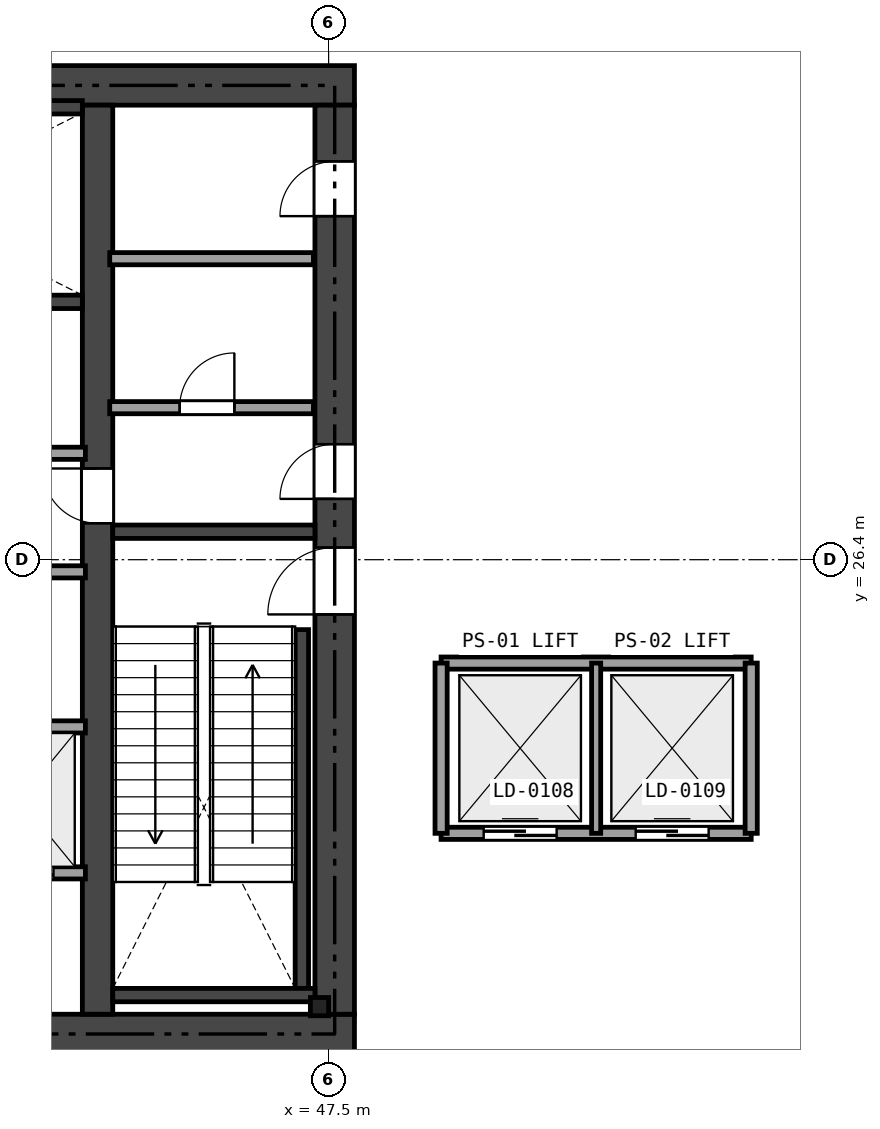
"""IFC4 building model, lengths in metres.
Left out: names, types, materials, properties, quantities, classifications, styles, units other than length and angle.
Written with IfcOpenShell. Run it as: python <this file> out.ifc"""

import sys

from ifc_helpers import new_model, si_unit, direction, frame, frame_2d, origin, origin_2d, place, context, subcontext, project, spatial, rectangle, i_section, extrude, element, fill, save


model = new_model("IFC4")
c1 = context("Model", 3, precision=1e-05, world=origin(), true_north=direction((0.0, 1.0)))
c2 = subcontext(c1, "Body", "Model", "MODEL_VIEW")
j1 = project(units=[si_unit("LENGTHUNIT", "METRE"), si_unit("PLANEANGLEUNIT", "RADIAN")], contexts=[c1])
p1 = place(None, origin())
s1 = spatial("IfcSite", under=j1, at=p1, CompositionType="ELEMENT")
p2 = place(p1, origin())
s2 = spatial("IfcBuilding", under=s1, at=p2, CompositionType="ELEMENT")
p3 = place(p2, frame((0.0, 0.0, 5.4)))
s3 = spatial("IfcBuildingStorey", under=s2, at=p3, CompositionType="ELEMENT", Elevation=5.4)
p4 = place(p3, frame((26.475, 18.6, 0.0), z_axis=(0.0, 0.0, 1.0), x_axis=(1.0, 0.0, 0.0)))
e1 = element("IfcWall", 1, at=p4, inside=s3, PredefinedType="SHEAR", context=c2, shape_type="SweptSolid", body=[
    extrude(rectangle(XDim=21.45, YDim=0.65, at=frame_2d((10.725, 0.0))), origin(), (0.0, 0.0, 1.0), 5.05),
])
p5 = place(p4, frame((12.45, 0.0, 0.0)))
e2 = element("IfcOpeningElement", 2, at=p5, cuts=e1, PredefinedType="OPENING", context=c2, shape_type="SweptSolid", body=[
    extrude(rectangle(XDim=1.15, YDim=2.15, at=frame_2d((0.575, 1.075))), frame((0.0, 0.335, 0.0), z_axis=(0.0, -1.0, 0.0), x_axis=(1.0, 0.0, 0.0)), (0.0, 0.0, 1.0), 0.67),
])
p6 = place(p4, frame((5.275, 0.0, 0.0)))
e3 = element("IfcOpeningElement", 3, at=p6, cuts=e1, PredefinedType="OPENING", context=c2, shape_type="SweptSolid", body=[
    extrude(rectangle(XDim=0.9, YDim=2.1, at=frame_2d((0.45, 1.05))), frame((0.0, 0.335, 0.0), z_axis=(0.0, -1.0, 0.0), x_axis=(1.0, 0.0, 0.0)), (0.0, 0.0, 1.0), 0.67),
])
p7 = place(p3, frame((26.475, 34.2, 0.0), z_axis=(0.0, 0.0, 1.0), x_axis=(1.0, 0.0, 0.0)))
e4 = element("IfcWall", 4, at=p7, inside=s3, PredefinedType="SHEAR", context=c2, shape_type="SweptSolid", body=[
    extrude(rectangle(XDim=21.45, YDim=0.65, at=frame_2d((10.725, 0.0))), origin(), (0.0, 0.0, 1.0), 5.05),
])
p8 = place(p7, frame((9.725, 0.0, 0.0)))
e5 = element("IfcOpeningElement", 5, at=p8, cuts=e4, PredefinedType="OPENING", context=c2, shape_type="SweptSolid", body=[
    extrude(rectangle(XDim=1.1, YDim=2.15, at=frame_2d((0.55, 1.075))), frame((0.0, 0.335, 0.0), z_axis=(0.0, -1.0, 0.0), x_axis=(1.0, 0.0, 0.0)), (0.0, 0.0, 1.0), 0.67),
])
p9 = place(p7, frame((1.975, 0.0, 0.0)))
e6 = element("IfcOpeningElement", 6, at=p9, cuts=e4, PredefinedType="OPENING", context=c2, shape_type="SweptSolid", body=[
    extrude(rectangle(XDim=0.9, YDim=2.1, at=frame_2d((0.45, 1.05))), frame((0.0, 0.335, 0.0), z_axis=(0.0, -1.0, 0.0), x_axis=(1.0, 0.0, 0.0)), (0.0, 0.0, 1.0), 0.67),
])
p10 = place(p7, frame((6.275, 0.0, 0.0)))
e7 = element("IfcOpeningElement", 7, at=p10, cuts=e4, PredefinedType="OPENING", context=c2, shape_type="SweptSolid", body=[
    extrude(rectangle(XDim=0.9, YDim=2.1, at=frame_2d((0.45, 1.05))), frame((0.0, 0.335, 0.0), z_axis=(0.0, -1.0, 0.0), x_axis=(1.0, 0.0, 0.0)), (0.0, 0.0, 1.0), 0.67),
])
p11 = place(p3, frame((47.6, 18.925, 0.0), z_axis=(0.0, 0.0, 1.0), x_axis=(0.0, 1.0, 0.0)))
e8 = element("IfcWall", 8, at=p11, inside=s3, PredefinedType="SHEAR", context=c2, shape_type="SweptSolid", body=[
    extrude(rectangle(XDim=14.95, YDim=0.65, at=frame_2d((7.475, 0.0))), origin(), (0.0, 0.0, 1.0), 5.05),
])
p12 = place(p11, frame((6.575, 0.0, 0.0)))
e9 = element("IfcOpeningElement", 9, at=p12, cuts=e8, PredefinedType="OPENING", context=c2, shape_type="SweptSolid", body=[
    extrude(rectangle(XDim=1.1, YDim=2.15, at=frame_2d((0.55, 1.075))), frame((0.0, 0.335, 0.0), z_axis=(0.0, -1.0, 0.0), x_axis=(1.0, 0.0, 0.0)), (0.0, 0.0, 1.0), 0.67),
])
p13 = place(p11, frame((8.475, 0.0, 0.0)))
e10 = element("IfcOpeningElement", 10, at=p13, cuts=e8, PredefinedType="OPENING", context=c2, shape_type="SweptSolid", body=[
    extrude(rectangle(XDim=0.9, YDim=2.1, at=frame_2d((0.45, 1.05))), frame((0.0, 0.335, 0.0), z_axis=(0.0, -1.0, 0.0), x_axis=(1.0, 0.0, 0.0)), (0.0, 0.0, 1.0), 0.67),
])
p14 = place(p11, frame((13.125, 0.0, 0.0)))
e11 = element("IfcOpeningElement", 11, at=p14, cuts=e8, PredefinedType="OPENING", context=c2, shape_type="SweptSolid", body=[
    extrude(rectangle(XDim=0.9, YDim=2.1, at=frame_2d((0.45, 1.05))), frame((0.0, 0.335, 0.0), z_axis=(0.0, -1.0, 0.0), x_axis=(1.0, 0.0, 0.0)), (0.0, 0.0, 1.0), 0.67),
])
p15 = place(p3, frame((43.7, 18.925, 0.0), z_axis=(0.0, 0.0, 1.0), x_axis=(0.0, 1.0, 0.0)))
e12 = element("IfcWall", 12, at=p15, inside=s3, PredefinedType="SHEAR", context=c2, shape_type="SweptSolid", body=[
    extrude(rectangle(XDim=14.95, YDim=0.5, at=frame_2d((7.475, 0.0))), origin(), (0.0, 0.0, 1.0), 5.05),
])
p16 = place(p15, frame((8.075, 0.0, 0.0)))
e13 = element("IfcOpeningElement", 13, at=p16, cuts=e12, PredefinedType="OPENING", context=c2, shape_type="SweptSolid", body=[
    extrude(rectangle(XDim=0.9, YDim=2.1, at=frame_2d((0.45, 1.05))), frame((0.0, 0.26, 0.0), z_axis=(0.0, -1.0, 0.0), x_axis=(1.0, 0.0, 0.0)), (0.0, 0.0, 1.0), 0.52),
])
p17 = place(p3, frame((43.95, 26.86, 0.0), z_axis=(0.0, 0.0, 1.0), x_axis=(1.0, 0.0, 0.0)))
e14 = element("IfcWall", 14, at=p17, inside=s3, PredefinedType="SHEAR", context=c2, shape_type="SweptSolid", body=[
    extrude(rectangle(XDim=3.325, YDim=0.22, at=frame_2d((1.663, 0.0))), origin(), (0.0, 0.0, 1.0), 5.05),
])
p18 = place(p3, frame((47.06, 19.35, 0.0), z_axis=(0.0, 0.0, 1.0), x_axis=(0.0, 1.0, 0.0)))
e15 = element("IfcWall", 15, at=p18, inside=s3, PredefinedType="SHEAR", context=c2, shape_type="SweptSolid", body=[
    extrude(rectangle(XDim=5.9, YDim=0.22, at=frame_2d((2.95, 0.0))), origin(), (0.0, 0.0, 1.0), 5.05),
])
p19 = place(p3, frame((43.95, 19.24, 0.0), z_axis=(0.0, 0.0, 1.0), x_axis=(1.0, 0.0, 0.0)))
e16 = element("IfcWall", 16, at=p19, inside=s3, PredefinedType="SHEAR", context=c2, shape_type="SweptSolid", body=[
    extrude(rectangle(XDim=3.325, YDim=0.22, at=frame_2d((1.663, 0.0))), origin(), (0.0, 0.0, 1.0), 5.05),
])
p20 = place(p3, frame((35.84, 30.64, 0.0), z_axis=(0.0, 0.0, 1.0), x_axis=(1.0, 0.0, 0.0)))
e17 = element("IfcWall", 17, at=p20, inside=s3, PredefinedType="SHEAR", context=c2, shape_type="SweptSolid", body=[
    extrude(rectangle(XDim=7.61, YDim=0.22, at=frame_2d((3.805, 0.0))), origin(), (0.0, 0.0, 1.0), 5.05),
])
p21 = place(p3, frame((37.55, 33.84, 0.0), z_axis=(0.0, 0.0, 1.0), x_axis=(1.0, 0.0, 0.0)))
e18 = element("IfcWall", 18, at=p21, inside=s3, PredefinedType="SHEAR", context=c2, shape_type="SweptSolid", body=[
    extrude(rectangle(XDim=5.9, YDim=0.22, at=frame_2d((2.95, 0.0))), origin(), (0.0, 0.0, 1.0), 5.05),
])
p22 = place(p3, frame((47.35, 19.05, 0.0), z_axis=(0.0, 0.0, 1.0), x_axis=(1.0, 0.0, 0.0)))
e19 = element("IfcColumn", 19, at=p22, inside=s3, PredefinedType="PILASTER", context=c2, shape_type="SweptSolid", body=[
    extrude(i_section(OverallWidth=0.3, OverallDepth=0.3, WebThickness=0.011, FlangeThickness=0.019, at=origin_2d()), origin(), (0.0, 0.0, 1.0), 5.05),
])
p23 = place(p3, frame((43.9, 28.9, 0.0), z_axis=(0.0, 0.0, 1.0), x_axis=(1.0, 0.0, 0.0)))
e20 = element("IfcWall", 20, at=p23, inside=s3, PredefinedType="SOLIDWALL", context=c2, shape_type="SweptSolid", body=[
    extrude(rectangle(XDim=3.35, YDim=0.2, at=frame_2d((1.675, 0.0))), origin(), (0.0, 0.0, 1.0), 5.05),
])
p24 = place(p23, frame((1.15, 0.0, 0.0)))
e21 = element("IfcOpeningElement", 21, at=p24, cuts=e20, PredefinedType="OPENING", context=c2, shape_type="SweptSolid", body=[
    extrude(rectangle(XDim=0.9, YDim=2.1, at=frame_2d((0.45, 1.05))), frame((0.0, 0.11, 0.0), z_axis=(0.0, -1.0, 0.0), x_axis=(1.0, 0.0, 0.0)), (0.0, 0.0, 1.0), 0.22),
])
p25 = place(p3, frame((43.9, 31.35, 0.0), z_axis=(0.0, 0.0, 1.0), x_axis=(1.0, 0.0, 0.0)))
e22 = element("IfcWall", 22, at=p25, inside=s3, PredefinedType="SOLIDWALL", context=c2, shape_type="SweptSolid", body=[
    extrude(rectangle(XDim=3.35, YDim=0.2, at=frame_2d((1.675, 0.0))), origin(), (0.0, 0.0, 1.0), 5.05),
])
for number, where, z_axis, x_axis in (
    (23, (35.62, 28.15, 0.0), (0.0, 0.0, 1.0), (1.0, 0.0, 0.0)),
    (24, (35.62, 26.2, 0.0), (0.0, 0.0, 1.0), (1.0, 0.0, 0.0)),
):
    element("IfcWall", number, at=place(p3, frame(where, z_axis=z_axis, x_axis=x_axis)), inside=s3, PredefinedType="SOLIDWALL", context=c2, shape_type="SweptSolid", body=[
        extrude(rectangle(XDim=7.88, YDim=0.2, at=frame_2d((3.94, 0.0))), origin(), (0.0, 0.0, 1.0), 5.05),
    ])
p26 = place(p3, frame((35.62, 23.65, 0.0), z_axis=(0.0, 0.0, 1.0), x_axis=(1.0, 0.0, 0.0)))
e25 = element("IfcWall", 25, at=p26, inside=s3, PredefinedType="SOLIDWALL", context=c2, shape_type="SweptSolid", body=[
    extrude(rectangle(XDim=7.88, YDim=0.2, at=frame_2d((3.94, 0.0))), origin(), (0.0, 0.0, 1.0), 4.571),
])
p27 = place(p3, frame((35.62, 21.25, 0.0), z_axis=(0.0, 0.0, 1.0), x_axis=(1.0, 0.0, 0.0)))
e26 = element("IfcWall", 26, at=p27, inside=s3, PredefinedType="SOLIDWALL", context=c2, shape_type="SweptSolid", body=[
    extrude(rectangle(XDim=7.88, YDim=0.2, at=frame_2d((3.94, 0.0))), origin(), (0.0, 0.0, 1.0), 5.05),
])
p28 = place(p27, frame((0.405, 0.0, 0.0)))
e27 = element("IfcOpeningElement", 27, at=p28, cuts=e26, PredefinedType="OPENING", context=c2, shape_type="SweptSolid", body=[
    extrude(rectangle(XDim=1.1, YDim=2.15, at=frame_2d((0.55, 1.075))), frame((0.0, 0.11, 0.0), z_axis=(0.0, -1.0, 0.0), x_axis=(1.0, 0.0, 0.0)), (0.0, 0.0, 1.0), 0.22),
])
p29 = place(p27, frame((2.355, 0.0, 0.0)))
e28 = element("IfcOpeningElement", 28, at=p29, cuts=e26, PredefinedType="OPENING", context=c2, shape_type="SweptSolid", body=[
    extrude(rectangle(XDim=1.1, YDim=2.15, at=frame_2d((0.55, 1.075))), frame((0.0, 0.11, 0.0), z_axis=(0.0, -1.0, 0.0), x_axis=(1.0, 0.0, 0.0)), (0.0, 0.0, 1.0), 0.22),
])
p30 = place(p27, frame((4.305, 0.0, 0.0)))
e29 = element("IfcOpeningElement", 29, at=p30, cuts=e26, PredefinedType="OPENING", context=c2, shape_type="SweptSolid", body=[
    extrude(rectangle(XDim=1.1, YDim=2.15, at=frame_2d((0.55, 1.075))), frame((0.0, 0.11, 0.0), z_axis=(0.0, -1.0, 0.0), x_axis=(1.0, 0.0, 0.0)), (0.0, 0.0, 1.0), 0.22),
])
p31 = place(p27, frame((6.255, 0.0, 0.0)))
e30 = element("IfcOpeningElement", 30, at=p31, cuts=e26, PredefinedType="OPENING", context=c2, shape_type="SweptSolid", body=[
    extrude(rectangle(XDim=1.1, YDim=2.15, at=frame_2d((0.55, 1.075))), frame((0.0, 0.11, 0.0), z_axis=(0.0, -1.0, 0.0), x_axis=(1.0, 0.0, 0.0)), (0.0, 0.0, 1.0), 0.22),
])
p32 = place(p3, frame((49.35, 24.7, 0.0), z_axis=(0.0, 0.0, 1.0), x_axis=(1.0, 0.0, 0.0)))
e31 = element("IfcWall", 31, at=p32, inside=s3, PredefinedType="SOLIDWALL", context=c2, shape_type="SweptSolid", body=[
    extrude(rectangle(XDim=5.1, YDim=0.2, at=frame_2d((2.55, 0.0))), origin(), (0.0, 0.0, 1.0), 5.05),
])
p33 = place(p3, frame((49.35, 21.9, 0.0), z_axis=(0.0, 0.0, 1.0), x_axis=(1.0, 0.0, 0.0)))
e32 = element("IfcWall", 32, at=p33, inside=s3, PredefinedType="SOLIDWALL", context=c2, shape_type="SweptSolid", body=[
    extrude(rectangle(XDim=5.1, YDim=0.2, at=frame_2d((2.55, 0.0))), origin(), (0.0, 0.0, 1.0), 5.05),
])
p34 = place(p33, frame((0.7, 0.0, 0.0)))
e33 = element("IfcOpeningElement", 33, at=p34, cuts=e32, PredefinedType="OPENING", context=c2, shape_type="SweptSolid", body=[
    extrude(rectangle(XDim=1.2, YDim=2.15, at=frame_2d((0.6, 1.075))), frame((0.0, 0.11, 0.0), z_axis=(0.0, -1.0, 0.0), x_axis=(1.0, 0.0, 0.0)), (0.0, 0.0, 1.0), 0.22),
])
p35 = place(p33, frame((3.2, 0.0, 0.0)))
e34 = element("IfcOpeningElement", 34, at=p35, cuts=e32, PredefinedType="OPENING", context=c2, shape_type="SweptSolid", body=[
    extrude(rectangle(XDim=1.2, YDim=2.15, at=frame_2d((0.6, 1.075))), frame((0.0, 0.11, 0.0), z_axis=(0.0, -1.0, 0.0), x_axis=(1.0, 0.0, 0.0)), (0.0, 0.0, 1.0), 0.22),
])
for number, where, z_axis, x_axis in (
    (35, (49.35, 21.9, 0.0), (0.0, 0.0, 1.0), (0.0, 1.0, 0.0)),
    (36, (54.45, 21.9, 0.0), (0.0, 0.0, 1.0), (0.0, 1.0, 0.0)),
):
    element("IfcWall", number, at=place(p3, frame(where, z_axis=z_axis, x_axis=x_axis)), inside=s3, PredefinedType="SOLIDWALL", context=c2, shape_type="SweptSolid", body=[
        extrude(rectangle(XDim=2.8, YDim=0.2, at=frame_2d((1.4, 0.0))), origin(), (0.0, 0.0, 1.0), 5.05),
    ])
p36 = place(p3, frame((51.9, 21.9, 0.0), z_axis=(0.0, 0.0, 1.0), x_axis=(0.0, 1.0, 0.0)))
e37 = element("IfcWall", 37, at=p36, inside=s3, PredefinedType="PARTITIONING", context=c2, shape_type="SweptSolid", body=[
    extrude(rectangle(XDim=2.8, YDim=0.15, at=frame_2d((1.4, 0.0))), origin(), (0.0, 0.0, 1.0), 5.05),
])
p37 = place(p12, origin())
e38 = element("IfcDoor", 38, at=p37, inside=s3, OperationType="SINGLE_SWING_LEFT", PredefinedType="DOOR", context=c2, shape_type="SweptSolid", body=[
    extrude(rectangle(XDim=1.1, YDim=2.15, at=frame_2d((0.55, 1.075))), frame((0.0, 0.025, 0.0), z_axis=(0.0, -1.0, 0.0), x_axis=(1.0, 0.0, 0.0)), (0.0, 0.0, 1.0), 0.05),
])
fill(e9, e38)
p38 = place(p16, origin())
e39 = element("IfcDoor", 39, at=p38, inside=s3, OperationType="SINGLE_SWING_RIGHT", PredefinedType="DOOR", context=c2, shape_type="SweptSolid", body=[
    extrude(rectangle(XDim=0.9, YDim=2.1, at=frame_2d((0.45, 1.05))), frame((0.0, 0.025, 0.0), z_axis=(0.0, -1.0, 0.0), x_axis=(1.0, 0.0, 0.0)), (0.0, 0.0, 1.0), 0.05),
])
fill(e13, e39)
p39 = place(p13, origin())
e40 = element("IfcDoor", 40, at=p39, inside=s3, OperationType="SINGLE_SWING_LEFT", PredefinedType="DOOR", context=c2, shape_type="SweptSolid", body=[
    extrude(rectangle(XDim=0.9, YDim=2.1, at=frame_2d((0.45, 1.05))), frame((0.0, 0.025, 0.0), z_axis=(0.0, -1.0, 0.0), x_axis=(1.0, 0.0, 0.0)), (0.0, 0.0, 1.0), 0.05),
])
fill(e10, e40)
p40 = place(p24, origin())
e41 = element("IfcDoor", 41, at=p40, inside=s3, OperationType="SINGLE_SWING_RIGHT", PredefinedType="DOOR", context=c2, shape_type="SweptSolid", body=[
    extrude(rectangle(XDim=0.9, YDim=2.1, at=frame_2d((0.45, 1.05))), frame((0.0, 0.025, 0.0), z_axis=(0.0, -1.0, 0.0), x_axis=(1.0, 0.0, 0.0)), (0.0, 0.0, 1.0), 0.05),
])
fill(e21, e41)
p41 = place(p14, origin())
e42 = element("IfcDoor", 42, at=p41, inside=s3, OperationType="SINGLE_SWING_LEFT", PredefinedType="DOOR", context=c2, shape_type="SweptSolid", body=[
    extrude(rectangle(XDim=0.9, YDim=2.1, at=frame_2d((0.45, 1.05))), frame((0.0, 0.025, 0.0), z_axis=(0.0, -1.0, 0.0), x_axis=(1.0, 0.0, 0.0)), (0.0, 0.0, 1.0), 0.05),
])
fill(e11, e42)
p42 = place(p31, origin())
e43 = element("IfcDoor", 43, at=p42, inside=s3, OperationType="SLIDING_TO_LEFT", PredefinedType="DOOR", context=c2, shape_type="SweptSolid", body=[
    extrude(rectangle(XDim=1.1, YDim=2.15, at=frame_2d((0.55, 1.075))), frame((0.0, 0.025, 0.0), z_axis=(0.0, -1.0, 0.0), x_axis=(1.0, 0.0, 0.0)), (0.0, 0.0, 1.0), 0.05),
])
fill(e30, e43)
p43 = place(p34, origin())
e44 = element("IfcDoor", 44, at=p43, inside=s3, OperationType="SLIDING_TO_LEFT", PredefinedType="DOOR", context=c2, shape_type="SweptSolid", body=[
    extrude(rectangle(XDim=1.2, YDim=2.15, at=frame_2d((0.6, 1.075))), frame((0.0, 0.025, 0.0), z_axis=(0.0, -1.0, 0.0), x_axis=(1.0, 0.0, 0.0)), (0.0, 0.0, 1.0), 0.05),
])
fill(e33, e44)
p44 = place(p35, origin())
e45 = element("IfcDoor", 45, at=p44, inside=s3, OperationType="SLIDING_TO_LEFT", PredefinedType="DOOR", context=c2, shape_type="SweptSolid", body=[
    extrude(rectangle(XDim=1.2, YDim=2.15, at=frame_2d((0.6, 1.075))), frame((0.0, 0.025, 0.0), z_axis=(0.0, -1.0, 0.0), x_axis=(1.0, 0.0, 0.0)), (0.0, 0.0, 1.0), 0.05),
])
fill(e34, e45)
save(model, sys.argv[1])
